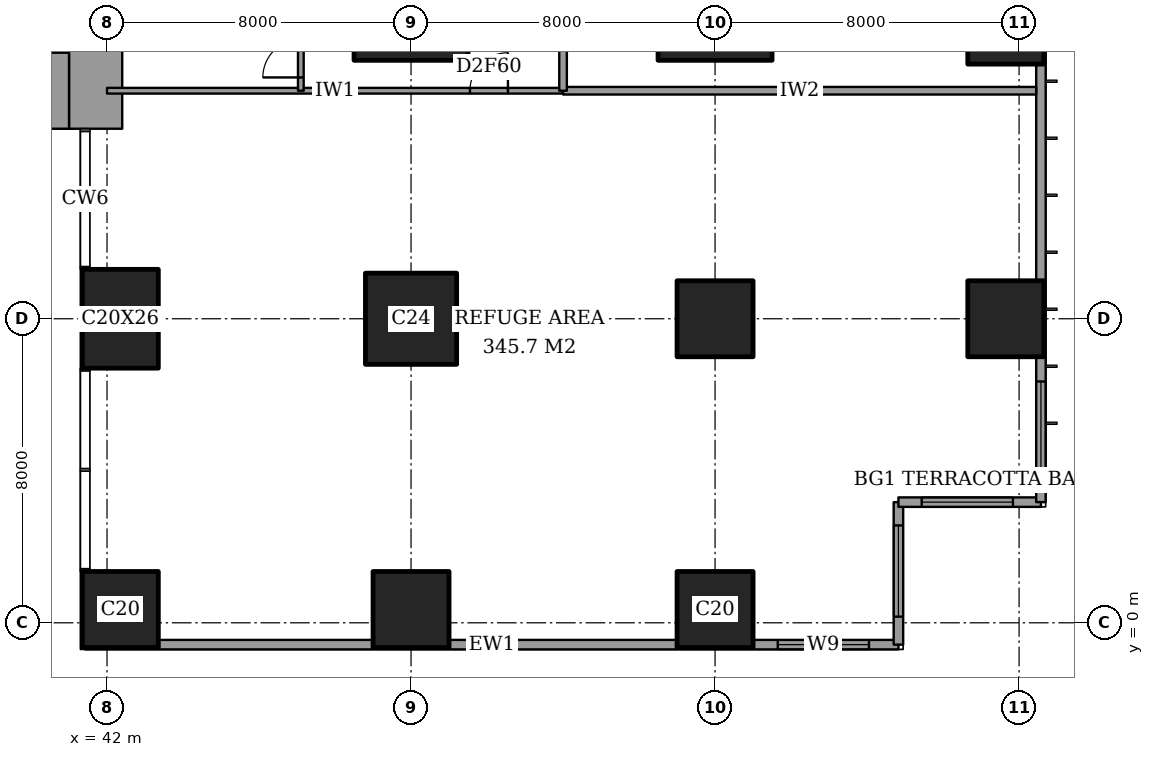
"""IFC4 building model, lengths in metres.
Left out: names, types, materials, properties, quantities, classifications, styles, units other than length and angle.
Written with IfcOpenShell. Run it as: python <this file> out.ifc"""

import sys

from ifc_helpers import new_model, si_unit, direction, frame, frame_2d, origin, origin_2d, place, context, subcontext, project, spatial, rectangle, extrude, element, fill, save


model = new_model("IFC4")
c1 = context("Model", 3, precision=1e-05, world=origin(), true_north=direction((0.0, 1.0)))
c2 = subcontext(c1, "Body", "Model", "MODEL_VIEW")
j1 = project(units=[si_unit("LENGTHUNIT", "METRE"), si_unit("PLANEANGLEUNIT", "RADIAN")], contexts=[c1])
p1 = place(None, origin())
s1 = spatial("IfcSite", under=j1, at=p1, CompositionType="ELEMENT")
p2 = place(p1, origin())
s2 = spatial("IfcBuilding", under=s1, at=p2, CompositionType="ELEMENT")
p3 = place(p2, frame((0.0, 0.0, 90.8)))
s3 = spatial("IfcBuildingStorey", under=s2, at=p3, CompositionType="ELEMENT", Elevation=90.8)
p4 = place(p3, frame((42.35, 0.35, 0.0), z_axis=(0.0, 0.0, 1.0), x_axis=(1.0, 0.0, 0.0)))
e1 = element("IfcColumn", 1, at=p4, inside=s3, PredefinedType="COLUMN", context=c2, shape_type="SweptSolid", body=[
    extrude(rectangle(XDim=2.0, YDim=2.0, at=origin_2d()), origin(), (0.0, 0.0, 1.0), 5.4),
])
p5 = place(p3, frame((42.35, 8.0, 0.0), z_axis=(0.0, 0.0, 1.0), x_axis=(1.0, 0.0, 0.0)))
e2 = element("IfcColumn", 2, at=p5, inside=s3, PredefinedType="COLUMN", context=c2, shape_type="SweptSolid", body=[
    extrude(rectangle(XDim=2.0, YDim=2.6, at=origin_2d()), origin(), (0.0, 0.0, 1.0), 5.4),
])
p6 = place(p3, frame((50.0, 0.35, 0.0), z_axis=(0.0, 0.0, 1.0), x_axis=(1.0, 0.0, 0.0)))
e3 = element("IfcColumn", 3, at=p6, inside=s3, PredefinedType="COLUMN", context=c2, shape_type="SweptSolid", body=[
    extrude(rectangle(XDim=2.0, YDim=2.0, at=origin_2d()), origin(), (0.0, 0.0, 1.0), 5.4),
])
p7 = place(p3, frame((50.0, 8.0, 0.0), z_axis=(0.0, 0.0, 1.0), x_axis=(1.0, 0.0, 0.0)))
e4 = element("IfcColumn", 4, at=p7, inside=s3, PredefinedType="COLUMN", context=c2, shape_type="SweptSolid", body=[
    extrude(rectangle(XDim=2.4, YDim=2.4, at=origin_2d()), origin(), (0.0, 0.0, 1.0), 5.4),
])
p8 = place(p3, frame((50.0, 16.0, 0.0), z_axis=(0.0, 0.0, 1.0), x_axis=(1.0, 0.0, 0.0)))
e5 = element("IfcColumn", 5, at=p8, inside=s3, PredefinedType="COLUMN", context=c2, shape_type="SweptSolid", body=[
    extrude(rectangle(XDim=3.0, YDim=2.4, at=origin_2d()), origin(), (0.0, 0.0, 1.0), 5.4),
])
for number, where, z_axis, x_axis in (
    (6, (58.0, 0.35, 0.0), (0.0, 0.0, 1.0), (1.0, 0.0, 0.0)),
    (7, (58.0, 8.0, 0.0), (0.0, 0.0, 1.0), (1.0, 0.0, 0.0)),
):
    element("IfcColumn", number, at=place(p3, frame(where, z_axis=z_axis, x_axis=x_axis)), inside=s3, PredefinedType="COLUMN", context=c2, shape_type="SweptSolid", body=[
        extrude(rectangle(XDim=2.0, YDim=2.0, at=origin_2d()), origin(), (0.0, 0.0, 1.0), 5.4),
    ])
p9 = place(p3, frame((58.0, 16.0, 0.0), z_axis=(0.0, 0.0, 1.0), x_axis=(1.0, 0.0, 0.0)))
e8 = element("IfcColumn", 8, at=p9, inside=s3, PredefinedType="COLUMN", context=c2, shape_type="SweptSolid", body=[
    extrude(rectangle(XDim=3.0, YDim=2.4, at=origin_2d()), origin(), (0.0, 0.0, 1.0), 5.4),
])
p10 = place(p3, frame((65.65, 8.0, 0.0), z_axis=(0.0, 0.0, 1.0), x_axis=(1.0, 0.0, 0.0)))
e9 = element("IfcColumn", 9, at=p10, inside=s3, PredefinedType="COLUMN", context=c2, shape_type="SweptSolid", body=[
    extrude(rectangle(XDim=2.0, YDim=2.0, at=origin_2d()), origin(), (0.0, 0.0, 1.0), 5.4),
])
p11 = place(p3, frame((65.65, 16.0, 0.0), z_axis=(0.0, 0.0, 1.0), x_axis=(0.0, 1.0, 0.0)))
e10 = element("IfcColumn", 10, at=p11, inside=s3, PredefinedType="COLUMN", context=c2, shape_type="SweptSolid", body=[
    extrude(rectangle(XDim=2.6, YDim=2.0, at=origin_2d()), origin(), (0.0, 0.0, 1.0), 5.4),
])
p12 = place(p3, frame((37.85, 14.0, 0.0), z_axis=(0.0, 0.0, 1.0), x_axis=(1.0, 0.0, 0.0)))
e11 = element("IfcWall", 11, at=p12, inside=s3, PredefinedType="SHEAR", context=c2, shape_type="SweptSolid", body=[
    extrude(rectangle(XDim=3.15, YDim=2.0, at=frame_2d((1.575, 0.0))), origin(), (0.0, 0.0, 1.0), 5.4),
])
p13 = place(p3, frame((41.7, 13.0, 0.0), z_axis=(0.0, 0.0, 1.0), x_axis=(0.0, 1.0, 0.0)))
e12 = element("IfcWall", 12, at=p13, inside=s3, PredefinedType="SHEAR", context=c2, shape_type="SweptSolid", body=[
    extrude(rectangle(XDim=11.85, YDim=1.4, at=frame_2d((5.925, 0.0))), origin(), (0.0, 0.0, 1.0), 5.4),
])
p14 = place(p13, frame((7.5, 0.0, 0.0)))
e13 = element("IfcOpeningElement", 13, at=p14, cuts=e12, PredefinedType="OPENING", context=c2, shape_type="SweptSolid", body=[
    extrude(rectangle(XDim=1.8, YDim=2.4, at=frame_2d((0.9, 1.2))), frame((0.0, 0.71, 0.0), z_axis=(0.0, -1.0, 0.0), x_axis=(1.0, 0.0, 0.0)), (0.0, 0.0, 1.0), 1.42),
])
p15 = place(p3, frame((41.425, -0.575, 0.0), z_axis=(0.0, 0.0, 1.0), x_axis=(1.0, 0.0, 0.0)))
e14 = element("IfcWall", 14, at=p15, inside=s3, PredefinedType="SOLIDWALL", context=c2, shape_type="SweptSolid", body=[
    extrude(rectangle(XDim=21.4, YDim=0.25, at=frame_2d((10.7, 0.0))), origin(), (0.0, 0.0, 1.0), 5.4),
])
p16 = place(p15, frame((18.225, 0.0, 0.9)))
e15 = element("IfcOpeningElement", 15, at=p16, cuts=e14, PredefinedType="OPENING", context=c2, shape_type="SweptSolid", body=[
    extrude(rectangle(XDim=2.4, YDim=2.4, at=frame_2d((1.2, 1.2))), frame((0.0, 0.135, 0.0), z_axis=(0.0, -1.0, 0.0), x_axis=(1.0, 0.0, 0.0)), (0.0, 0.0, 1.0), 0.27),
])
p17 = place(p3, frame((62.825, -0.575, 0.0), z_axis=(0.0, 0.0, 1.0), x_axis=(0.0, 1.0, 0.0)))
e16 = element("IfcWall", 16, at=p17, inside=s3, PredefinedType="SOLIDWALL", context=c2, shape_type="SweptSolid", body=[
    extrude(rectangle(XDim=3.75, YDim=0.25, at=frame_2d((1.875, 0.0))), origin(), (0.0, 0.0, 1.0), 5.4),
])
p18 = place(p17, frame((0.738, 0.0, 0.9)))
e17 = element("IfcOpeningElement", 17, at=p18, cuts=e16, PredefinedType="OPENING", context=c2, shape_type="SweptSolid", body=[
    extrude(rectangle(XDim=2.4, YDim=2.4, at=frame_2d((1.2, 1.2))), frame((0.0, 0.135, 0.0), z_axis=(0.0, -1.0, 0.0), x_axis=(1.0, 0.0, 0.0)), (0.0, 0.0, 1.0), 0.27),
])
p19 = place(p3, frame((62.825, 3.175, 0.0), z_axis=(0.0, 0.0, 1.0), x_axis=(1.0, 0.0, 0.0)))
e18 = element("IfcWall", 18, at=p19, inside=s3, PredefinedType="SOLIDWALL", context=c2, shape_type="SweptSolid", body=[
    extrude(rectangle(XDim=3.75, YDim=0.25, at=frame_2d((1.875, 0.0))), origin(), (0.0, 0.0, 1.0), 5.4),
])
p20 = place(p19, frame((0.613, 0.0, 0.9)))
e19 = element("IfcOpeningElement", 19, at=p20, cuts=e18, PredefinedType="OPENING", context=c2, shape_type="SweptSolid", body=[
    extrude(rectangle(XDim=2.4, YDim=2.4, at=frame_2d((1.2, 1.2))), frame((0.0, 0.135, 0.0), z_axis=(0.0, -1.0, 0.0), x_axis=(1.0, 0.0, 0.0)), (0.0, 0.0, 1.0), 0.27),
])
p21 = place(p3, frame((66.575, 3.175, 0.0), z_axis=(0.0, 0.0, 1.0), x_axis=(0.0, 1.0, 0.0)))
e20 = element("IfcWall", 20, at=p21, inside=s3, PredefinedType="SOLIDWALL", context=c2, shape_type="SweptSolid", body=[
    extrude(rectangle(XDim=41.65, YDim=0.25, at=frame_2d((20.825, 0.0))), origin(), (0.0, 0.0, 1.0), 5.4),
])
p22 = place(p21, frame((0.775, 0.0, 0.9)))
e21 = element("IfcOpeningElement", 21, at=p22, cuts=e20, PredefinedType="OPENING", context=c2, shape_type="SweptSolid", body=[
    extrude(rectangle(XDim=2.4, YDim=2.4, at=frame_2d((1.2, 1.2))), frame((0.0, 0.135, 0.0), z_axis=(0.0, -1.0, 0.0), x_axis=(1.0, 0.0, 0.0)), (0.0, 0.0, 1.0), 0.27),
])
p23 = place(p21, frame((38.475, 0.0, 0.9)))
e22 = element("IfcOpeningElement", 22, at=p23, cuts=e20, PredefinedType="OPENING", context=c2, shape_type="SweptSolid", body=[
    extrude(rectangle(XDim=2.4, YDim=2.4, at=frame_2d((1.2, 1.2))), frame((0.0, 0.135, 0.0), z_axis=(0.0, -1.0, 0.0), x_axis=(1.0, 0.0, 0.0)), (0.0, 0.0, 1.0), 0.27),
])
p24 = place(p3, frame((54.0, 14.0, 0.0), z_axis=(0.0, 0.0, 1.0), x_axis=(1.0, 0.0, 0.0)))
e23 = element("IfcWall", 23, at=p24, inside=s3, PredefinedType="PARTITIONING", context=c2, shape_type="SweptSolid", body=[
    extrude(rectangle(XDim=12.45, YDim=0.2, at=frame_2d((6.225, 0.0))), origin(), (0.0, 0.0, 1.0), 5.15),
])
p25 = place(p3, frame((42.0, 14.0, 0.0), z_axis=(0.0, 0.0, 1.0), x_axis=(1.0, 0.0, 0.0)))
e24 = element("IfcWall", 24, at=p25, inside=s3, PredefinedType="PARTITIONING", context=c2, shape_type="SweptSolid", body=[
    extrude(rectangle(XDim=12.0, YDim=0.15, at=frame_2d((6.0, 0.0))), origin(), (0.0, 0.0, 1.0), 5.15),
])
p26 = place(p25, frame((9.55, 0.0, 0.0)))
e25 = element("IfcOpeningElement", 25, at=p26, cuts=e24, PredefinedType="OPENING", context=c2, shape_type="SweptSolid", body=[
    extrude(rectangle(XDim=1.0, YDim=2.1, at=frame_2d((0.5, 1.05))), frame((0.0, 0.085, 0.0), z_axis=(0.0, -1.0, 0.0), x_axis=(1.0, 0.0, 0.0)), (0.0, 0.0, 1.0), 0.17),
])
p27 = place(p3, frame((47.1, 14.0, 0.0), z_axis=(0.0, 0.0, 1.0), x_axis=(0.0, 1.0, 0.0)))
e26 = element("IfcWall", 26, at=p27, inside=s3, PredefinedType="PARTITIONING", context=c2, shape_type="SweptSolid", body=[
    extrude(rectangle(XDim=6.0, YDim=0.15, at=frame_2d((3.0, 0.0))), origin(), (0.0, 0.0, 1.0), 5.15),
])
p28 = place(p27, frame((0.35, 0.0, 0.0)))
e27 = element("IfcOpeningElement", 27, at=p28, cuts=e26, PredefinedType="OPENING", context=c2, shape_type="SweptSolid", body=[
    extrude(rectangle(XDim=1.0, YDim=2.1, at=frame_2d((0.5, 1.05))), frame((0.0, 0.085, 0.0), z_axis=(0.0, -1.0, 0.0), x_axis=(1.0, 0.0, 0.0)), (0.0, 0.0, 1.0), 0.17),
])
p29 = place(p27, frame((4.25, 0.0, 0.0)))
e28 = element("IfcOpeningElement", 28, at=p29, cuts=e26, PredefinedType="OPENING", context=c2, shape_type="SweptSolid", body=[
    extrude(rectangle(XDim=1.0, YDim=2.1, at=frame_2d((0.5, 1.05))), frame((0.0, 0.085, 0.0), z_axis=(0.0, -1.0, 0.0), x_axis=(1.0, 0.0, 0.0)), (0.0, 0.0, 1.0), 0.17),
])
p30 = place(p3, frame((54.0, 14.0, 0.0), z_axis=(0.0, 0.0, 1.0), x_axis=(0.0, 1.0, 0.0)))
e29 = element("IfcWall", 29, at=p30, inside=s3, PredefinedType="PARTITIONING", context=c2, shape_type="SweptSolid", body=[
    extrude(rectangle(XDim=14.725, YDim=0.2, at=frame_2d((7.363, 0.0))), origin(), (0.0, 0.0, 1.0), 5.15),
])
p31 = place(p30, frame((6.863, 0.0, 0.0)))
e30 = element("IfcOpeningElement", 30, at=p31, cuts=e29, PredefinedType="OPENING", context=c2, shape_type="SweptSolid", body=[
    extrude(rectangle(XDim=1.0, YDim=2.1, at=frame_2d((0.5, 1.05))), frame((0.0, 0.11, 0.0), z_axis=(0.0, -1.0, 0.0), x_axis=(1.0, 0.0, 0.0)), (0.0, 0.0, 1.0), 0.22),
])
p32 = place(p16, origin())
e31 = element("IfcWindow", 31, at=p32, inside=s3, PartitioningType="SINGLE_PANEL", PredefinedType="WINDOW", context=c2, shape_type="SweptSolid", body=[
    extrude(rectangle(XDim=2.4, YDim=2.4, at=frame_2d((1.2, 1.2))), frame((0.0, 0.03, 0.0), z_axis=(0.0, -1.0, 0.0), x_axis=(1.0, 0.0, 0.0)), (0.0, 0.0, 1.0), 0.06),
])
fill(e15, e31)
p33 = place(p18, origin())
e32 = element("IfcWindow", 32, at=p33, inside=s3, PartitioningType="SINGLE_PANEL", PredefinedType="WINDOW", context=c2, shape_type="SweptSolid", body=[
    extrude(rectangle(XDim=2.4, YDim=2.4, at=frame_2d((1.2, 1.2))), frame((0.0, 0.03, 0.0), z_axis=(0.0, -1.0, 0.0), x_axis=(1.0, 0.0, 0.0)), (0.0, 0.0, 1.0), 0.06),
])
fill(e17, e32)
p34 = place(p20, origin())
e33 = element("IfcWindow", 33, at=p34, inside=s3, PartitioningType="SINGLE_PANEL", PredefinedType="WINDOW", context=c2, shape_type="SweptSolid", body=[
    extrude(rectangle(XDim=2.4, YDim=2.4, at=frame_2d((1.2, 1.2))), frame((0.0, 0.03, 0.0), z_axis=(0.0, -1.0, 0.0), x_axis=(1.0, 0.0, 0.0)), (0.0, 0.0, 1.0), 0.06),
])
fill(e19, e33)
p35 = place(p22, origin())
e34 = element("IfcWindow", 34, at=p35, inside=s3, PartitioningType="SINGLE_PANEL", PredefinedType="WINDOW", context=c2, shape_type="SweptSolid", body=[
    extrude(rectangle(XDim=2.4, YDim=2.4, at=frame_2d((1.2, 1.2))), frame((0.0, 0.03, 0.0), z_axis=(0.0, -1.0, 0.0), x_axis=(1.0, 0.0, 0.0)), (0.0, 0.0, 1.0), 0.06),
])
fill(e21, e34)
p36 = place(p26, origin())
e35 = element("IfcDoor", 35, at=p36, inside=s3, OperationType="SINGLE_SWING_LEFT", PredefinedType="DOOR", context=c2, shape_type="SweptSolid", body=[
    extrude(rectangle(XDim=1.0, YDim=2.1, at=frame_2d((0.5, 1.05))), frame((0.0, 0.025, 0.0), z_axis=(0.0, -1.0, 0.0), x_axis=(1.0, 0.0, 0.0)), (0.0, 0.0, 1.0), 0.05),
])
fill(e25, e35)
p37 = place(p28, origin())
e36 = element("IfcDoor", 36, at=p37, inside=s3, OperationType="SINGLE_SWING_RIGHT", PredefinedType="DOOR", context=c2, shape_type="SweptSolid", body=[
    extrude(rectangle(XDim=1.0, YDim=2.1, at=frame_2d((0.5, 1.05))), frame((0.0, 0.025, 0.0), z_axis=(0.0, -1.0, 0.0), x_axis=(1.0, 0.0, 0.0)), (0.0, 0.0, 1.0), 0.05),
])
fill(e27, e36)
save(model, sys.argv[1])
